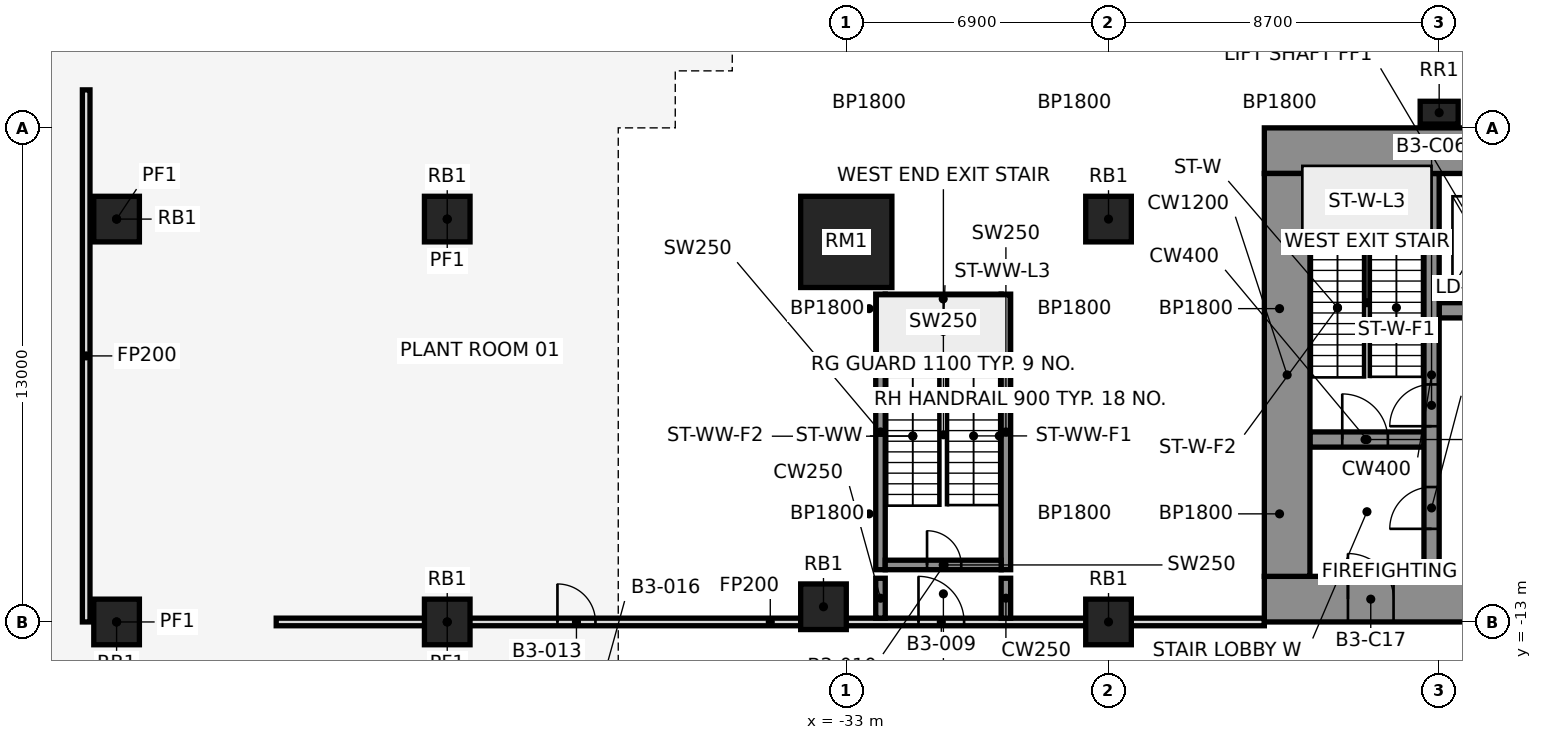
"""IFC4 building model, lengths in metres.
Left out: names, types, materials, properties, quantities, classifications, styles, units other than length and angle.
Written with IfcOpenShell. Run it as: python <this file> out.ifc"""

import sys

from ifc_helpers import new_model, si_unit, direction, frame, frame_2d, origin, origin_2d, place, context, subcontext, project, spatial, rectangle, extrude, element, fill, save


model = new_model("IFC4")
c1 = context("Model", 3, precision=1e-05, world=origin(), true_north=direction((0.0, 1.0)))
c2 = subcontext(c1, "Body", "Model", "MODEL_VIEW")
j1 = project(units=[si_unit("LENGTHUNIT", "METRE"), si_unit("PLANEANGLEUNIT", "RADIAN")], contexts=[c1])
p1 = place(None, origin())
s1 = spatial("IfcSite", under=j1, at=p1, CompositionType="ELEMENT")
p2 = place(p1, origin())
s2 = spatial("IfcBuilding", under=s1, at=p2, CompositionType="ELEMENT")
p3 = place(p2, frame((0.0, 0.0, -15.0)))
s3 = spatial("IfcBuildingStorey", under=s2, at=p3, CompositionType="ELEMENT", Elevation=-15.0)
p4 = place(p3, frame((-33.0, -3.0, 0.0), z_axis=(0.0, 0.0, 1.0), x_axis=(1.0, 0.0, 0.0)))
e1 = element("IfcColumn", 1, at=p4, inside=s3, PredefinedType="COLUMN", context=c2, shape_type="SweptSolid", body=[
    extrude(rectangle(XDim=2.4, YDim=2.4, at=origin_2d()), origin(), (0.0, 0.0, 1.0), 5.0),
])
p5 = place(p3, frame((-26.1, -2.4, 0.0), z_axis=(0.0, 0.0, 1.0), x_axis=(1.0, 0.0, 0.0)))
e2 = element("IfcColumn", 2, at=p5, inside=s3, PredefinedType="COLUMN", context=c2, shape_type="SweptSolid", body=[
    extrude(rectangle(XDim=1.2, YDim=1.2, at=origin_2d()), origin(), (0.0, 0.0, 1.0), 5.0),
])
p6 = place(p3, frame((-17.4, 0.4, 0.0), z_axis=(0.0, 0.0, 1.0), x_axis=(1.0, 0.0, 0.0)))
e3 = element("IfcColumn", 3, at=p6, inside=s3, PredefinedType="COLUMN", context=c2, shape_type="SweptSolid", body=[
    extrude(rectangle(XDim=1.0, YDim=0.6, at=origin_2d()), origin(), (0.0, 0.0, 1.0), 5.0),
])
p7 = place(p3, frame((-33.6, -12.6, 0.0), z_axis=(0.0, 0.0, 1.0), x_axis=(1.0, 0.0, 0.0)))
e4 = element("IfcColumn", 4, at=p7, inside=s3, PredefinedType="COLUMN", context=c2, shape_type="SweptSolid", body=[
    extrude(rectangle(XDim=1.2, YDim=1.2, at=origin_2d()), origin(), (0.0, 0.0, 1.0), 5.0),
])
for number, where, z_axis, x_axis in (
    (5, (-52.2, -2.4, -0.3), (0.0, 0.0, 1.0), (1.0, 0.0, 0.0)),
    (6, (-52.2, -13.0, -0.3), (0.0, 0.0, 1.0), (1.0, 0.0, 0.0)),
    (7, (-43.5, -2.4, -0.3), (0.0, 0.0, 1.0), (1.0, 0.0, 0.0)),
    (8, (-43.5, -13.0, -0.3), (0.0, 0.0, 1.0), (1.0, 0.0, 0.0)),
):
    element("IfcColumn", number, at=place(p3, frame(where, z_axis=z_axis, x_axis=x_axis)), inside=s3, PredefinedType="COLUMN", context=c2, shape_type="SweptSolid", body=[
        extrude(rectangle(XDim=1.2, YDim=1.2, at=origin_2d()), origin(), (0.0, 0.0, 1.0), 5.3),
    ])
p8 = place(p3, frame((-26.1, -13.0, 0.0), z_axis=(0.0, 0.0, 1.0), x_axis=(1.0, 0.0, 0.0)))
e9 = element("IfcColumn", 9, at=p8, inside=s3, PredefinedType="COLUMN", context=c2, shape_type="SweptSolid", body=[
    extrude(rectangle(XDim=1.2, YDim=1.2, at=origin_2d()), origin(), (0.0, 0.0, 1.0), 5.0),
])
for number, where, z_axis, x_axis in (
    (10, (-32.1, -11.625, 0.0), (0.0, 0.0, 1.0), (0.0, 1.0, 0.0)),
    (11, (-28.8, -11.625, 0.0), (0.0, 0.0, 1.0), (0.0, 1.0, 0.0)),
):
    element("IfcWall", number, at=place(p3, frame(where, z_axis=z_axis, x_axis=x_axis)), inside=s3, PredefinedType="SHEAR", context=c2, shape_type="SweptSolid", body=[
        extrude(rectangle(XDim=7.25, YDim=0.25, at=frame_2d((3.625, 0.0))), origin(), (0.0, 0.0, 1.0), 5.0),
    ])
p9 = place(p3, frame((-31.975, -11.5, 0.0), z_axis=(0.0, 0.0, 1.0), x_axis=(1.0, 0.0, 0.0)))
e12 = element("IfcWall", 12, at=p9, inside=s3, PredefinedType="SHEAR", context=c2, shape_type="SweptSolid", body=[
    extrude(rectangle(XDim=3.05, YDim=0.25, at=frame_2d((1.525, 0.0))), origin(), (0.0, 0.0, 1.0), 5.0),
])
p10 = place(p9, frame((1.1, 0.0, 0.0)))
e13 = element("IfcOpeningElement", 13, at=p10, cuts=e12, PredefinedType="OPENING", context=c2, shape_type="SweptSolid", body=[
    extrude(rectangle(XDim=0.9, YDim=2.1, at=frame_2d((0.45, 1.05))), frame((0.0, 0.137, 0.0), z_axis=(0.0, -1.0, 0.0), x_axis=(1.0, 0.0, 0.0)), (0.0, 0.0, 1.0), 0.274),
])
p11 = place(p3, frame((-31.975, -4.5, 0.0), z_axis=(0.0, 0.0, 1.0), x_axis=(1.0, 0.0, 0.0)))
e14 = element("IfcWall", 14, at=p11, inside=s3, PredefinedType="SHEAR", context=c2, shape_type="SweptSolid", body=[
    extrude(rectangle(XDim=3.05, YDim=0.25, at=frame_2d((1.525, 0.0))), origin(), (0.0, 0.0, 1.0), 5.0),
])
p12 = place(p3, frame((-48.0, -13.0, 0.0), z_axis=(0.0, 0.0, 1.0), x_axis=(1.0, 0.0, 0.0)))
e15 = element("IfcWall", 15, at=p12, inside=s3, PredefinedType="PARTITIONING", context=c2, shape_type="SweptSolid", body=[
    extrude(rectangle(XDim=26.0, YDim=0.2, at=frame_2d((13.0, 0.0))), origin(), (0.0, 0.0, 1.0), 4.7),
])
p13 = place(p12, frame((16.9, 0.0, 0.0)))
e16 = element("IfcOpeningElement", 16, at=p13, cuts=e15, PredefinedType="OPENING", context=c2, shape_type="SweptSolid", body=[
    extrude(rectangle(XDim=1.2, YDim=2.1, at=frame_2d((0.6, 1.05))), frame((0.0, 0.112, 0.0), z_axis=(0.0, -1.0, 0.0), x_axis=(1.0, 0.0, 0.0)), (0.0, 0.0, 1.0), 0.224),
])
p14 = place(p12, frame((7.4, 0.0, 0.0)))
e17 = element("IfcOpeningElement", 17, at=p14, cuts=e15, PredefinedType="OPENING", context=c2, shape_type="SweptSolid", body=[
    extrude(rectangle(XDim=1.0, YDim=2.1, at=frame_2d((0.5, 1.05))), frame((0.0, 0.112, 0.0), z_axis=(0.0, -1.0, 0.0), x_axis=(1.0, 0.0, 0.0)), (0.0, 0.0, 1.0), 0.224),
])
p15 = place(p3, frame((-53.0, -13.0, 0.0), z_axis=(0.0, 0.0, 1.0), x_axis=(0.0, 1.0, 0.0)))
e18 = element("IfcWall", 18, at=p15, inside=s3, PredefinedType="PARTITIONING", context=c2, shape_type="SweptSolid", body=[
    extrude(rectangle(XDim=14.0, YDim=0.2, at=frame_2d((7.0, 0.0))), origin(), (0.0, 0.0, 1.0), 4.7),
])
for number, where, z_axis, x_axis in (
    (19, (-32.1, -12.9, 0.0), (0.0, 0.0, 1.0), (0.0, 1.0, 0.0)),
    (20, (-28.8, -12.9, 0.0), (0.0, 0.0, 1.0), (0.0, 1.0, 0.0)),
):
    element("IfcWall", number, at=place(p3, frame(where, z_axis=z_axis, x_axis=x_axis)), inside=s3, PredefinedType="SHEAR", context=c2, shape_type="SweptSolid", body=[
        extrude(rectangle(XDim=1.05, YDim=0.25, at=frame_2d((0.525, 0.0))), origin(), (0.0, 0.0, 1.0), 5.0),
    ])
p16 = place(p3, frame((-20.8, -8.2, 0.0), z_axis=(0.0, 0.0, 1.0), x_axis=(1.0, 0.0, 0.0)))
e21 = element("IfcWall", 21, at=p16, inside=s3, PredefinedType="SHEAR", context=c2, shape_type="SweptSolid", body=[
    extrude(rectangle(XDim=3.0, YDim=0.4, at=frame_2d((1.5, 0.0))), origin(), (0.0, 0.0, 1.0), 5.0),
])
p17 = place(p16, frame((0.85, 0.0, 0.0)))
e22 = element("IfcOpeningElement", 22, at=p17, cuts=e21, PredefinedType="OPENING", context=c2, shape_type="SweptSolid", body=[
    extrude(rectangle(XDim=1.2, YDim=2.1, at=frame_2d((0.6, 1.05))), frame((0.0, 0.212, 0.0), z_axis=(0.0, -1.0, 0.0), x_axis=(1.0, 0.0, 0.0)), (0.0, 0.0, 1.0), 0.424),
])
p18 = place(p3, frame((-17.4, -4.8, 0.0), z_axis=(0.0, 0.0, 1.0), x_axis=(1.0, 0.0, 0.0)))
e23 = element("IfcWall", 23, at=p18, inside=s3, PredefinedType="SHEAR", context=c2, shape_type="SweptSolid", body=[
    extrude(rectangle(XDim=13.6, YDim=0.4, at=frame_2d((6.8, 0.0))), origin(), (0.0, 0.0, 1.0), 5.0),
])
p19 = place(p18, frame((0.65, 0.0, 0.0)))
e24 = element("IfcOpeningElement", 24, at=p19, cuts=e23, PredefinedType="OPENING", context=c2, shape_type="SweptSolid", body=[
    extrude(rectangle(XDim=1.1, YDim=2.1, at=frame_2d((0.55, 1.05))), frame((0.0, 0.212, 0.0), z_axis=(0.0, -1.0, 0.0), x_axis=(1.0, 0.0, 0.0)), (0.0, 0.0, 1.0), 0.424),
])
p20 = place(p18, frame((2.95, 0.0, 0.0)))
e25 = element("IfcOpeningElement", 25, at=p20, cuts=e23, PredefinedType="OPENING", context=c2, shape_type="SweptSolid", body=[
    extrude(rectangle(XDim=1.1, YDim=2.1, at=frame_2d((0.55, 1.05))), frame((0.0, 0.212, 0.0), z_axis=(0.0, -1.0, 0.0), x_axis=(1.0, 0.0, 0.0)), (0.0, 0.0, 1.0), 0.424),
])
p21 = place(p18, frame((5.65, 0.0, 0.0)))
e26 = element("IfcOpeningElement", 26, at=p21, cuts=e23, PredefinedType="OPENING", context=c2, shape_type="SweptSolid", body=[
    extrude(rectangle(XDim=1.2, YDim=2.1, at=frame_2d((0.6, 1.05))), frame((0.0, 0.212, 0.0), z_axis=(0.0, -1.0, 0.0), x_axis=(1.0, 0.0, 0.0)), (0.0, 0.0, 1.0), 0.424),
])
p22 = place(p18, frame((8.65, 0.0, 0.0)))
e27 = element("IfcOpeningElement", 27, at=p22, cuts=e23, PredefinedType="OPENING", context=c2, shape_type="SweptSolid", body=[
    extrude(rectangle(XDim=1.2, YDim=2.1, at=frame_2d((0.6, 1.05))), frame((0.0, 0.212, 0.0), z_axis=(0.0, -1.0, 0.0), x_axis=(1.0, 0.0, 0.0)), (0.0, 0.0, 1.0), 0.424),
])
p23 = place(p18, frame((11.65, 0.0, 0.0)))
e28 = element("IfcOpeningElement", 28, at=p23, cuts=e23, PredefinedType="OPENING", context=c2, shape_type="SweptSolid", body=[
    extrude(rectangle(XDim=1.2, YDim=2.1, at=frame_2d((0.6, 1.05))), frame((0.0, 0.212, 0.0), z_axis=(0.0, -1.0, 0.0), x_axis=(1.0, 0.0, 0.0)), (0.0, 0.0, 1.0), 0.424),
])
p24 = place(p3, frame((-17.6, -11.8, 0.0), z_axis=(0.0, 0.0, 1.0), x_axis=(0.0, 1.0, 0.0)))
e29 = element("IfcWall", 29, at=p24, inside=s3, PredefinedType="SHEAR", context=c2, shape_type="SweptSolid", body=[
    extrude(rectangle(XDim=10.6, YDim=0.4, at=frame_2d((5.3, 0.0))), origin(), (0.0, 0.0, 1.0), 5.0),
])
p25 = place(p24, frame((1.25, 0.0, 0.0)))
e30 = element("IfcOpeningElement", 30, at=p25, cuts=e29, PredefinedType="OPENING", context=c2, shape_type="SweptSolid", body=[
    extrude(rectangle(XDim=1.1, YDim=2.1, at=frame_2d((0.55, 1.05))), frame((0.0, 0.212, 0.0), z_axis=(0.0, -1.0, 0.0), x_axis=(1.0, 0.0, 0.0)), (0.0, 0.0, 1.0), 0.424),
])
p26 = place(p24, frame((3.95, 0.0, 0.0)))
e31 = element("IfcOpeningElement", 31, at=p26, cuts=e29, PredefinedType="OPENING", context=c2, shape_type="SweptSolid", body=[
    extrude(rectangle(XDim=1.1, YDim=2.1, at=frame_2d((0.55, 1.05))), frame((0.0, 0.212, 0.0), z_axis=(0.0, -1.0, 0.0), x_axis=(1.0, 0.0, 0.0)), (0.0, 0.0, 1.0), 0.424),
])
p27 = place(p3, frame((-22.0, -0.6, 0.0), z_axis=(0.0, 0.0, 1.0), x_axis=(1.0, 0.0, 0.0)))
e32 = element("IfcWall", 32, at=p27, inside=s3, PredefinedType="SHEAR", context=c2, shape_type="SweptSolid", body=[
    extrude(rectangle(XDim=44.0, YDim=1.2, at=frame_2d((22.0, 0.0))), origin(), (0.0, 0.0, 1.0), 5.0),
])
p28 = place(p3, frame((-22.0, -12.4, 0.0), z_axis=(0.0, 0.0, 1.0), x_axis=(1.0, 0.0, 0.0)))
e33 = element("IfcWall", 33, at=p28, inside=s3, PredefinedType="SHEAR", context=c2, shape_type="SweptSolid", body=[
    extrude(rectangle(XDim=44.0, YDim=1.2, at=frame_2d((22.0, 0.0))), origin(), (0.0, 0.0, 1.0), 5.0),
])
p29 = place(p28, frame((2.2, 0.0, 0.0)))
e34 = element("IfcOpeningElement", 34, at=p29, cuts=e33, PredefinedType="OPENING", context=c2, shape_type="SweptSolid", body=[
    extrude(rectangle(XDim=1.2, YDim=2.1, at=frame_2d((0.6, 1.05))), frame((0.0, 0.612, 0.0), z_axis=(0.0, -1.0, 0.0), x_axis=(1.0, 0.0, 0.0)), (0.0, 0.0, 1.0), 1.224),
])
p30 = place(p28, frame((21.4, 0.0, 0.0)))
e35 = element("IfcOpeningElement", 35, at=p30, cuts=e33, PredefinedType="OPENING", context=c2, shape_type="SweptSolid", body=[
    extrude(rectangle(XDim=1.2, YDim=2.1, at=frame_2d((0.6, 1.05))), frame((0.0, 0.612, 0.0), z_axis=(0.0, -1.0, 0.0), x_axis=(1.0, 0.0, 0.0)), (0.0, 0.0, 1.0), 1.224),
])
p31 = place(p28, frame((40.6, 0.0, 0.0)))
e36 = element("IfcOpeningElement", 36, at=p31, cuts=e33, PredefinedType="OPENING", context=c2, shape_type="SweptSolid", body=[
    extrude(rectangle(XDim=1.2, YDim=2.1, at=frame_2d((0.6, 1.05))), frame((0.0, 0.612, 0.0), z_axis=(0.0, -1.0, 0.0), x_axis=(1.0, 0.0, 0.0)), (0.0, 0.0, 1.0), 1.224),
])
p32 = place(p28, frame((16.0, 0.0, 0.0)))
e37 = element("IfcOpeningElement", 37, at=p32, cuts=e33, PredefinedType="OPENING", context=c2, shape_type="SweptSolid", body=[
    extrude(rectangle(XDim=1.8, YDim=2.1, at=frame_2d((0.9, 1.05))), frame((0.0, 0.612, 0.0), z_axis=(0.0, -1.0, 0.0), x_axis=(1.0, 0.0, 0.0)), (0.0, 0.0, 1.0), 1.224),
])
p33 = place(p28, frame((6.3, 0.0, 0.0)))
e38 = element("IfcOpeningElement", 38, at=p33, cuts=e33, PredefinedType="OPENING", context=c2, shape_type="SweptSolid", body=[
    extrude(rectangle(XDim=1.2, YDim=2.1, at=frame_2d((0.6, 1.05))), frame((0.0, 0.612, 0.0), z_axis=(0.0, -1.0, 0.0), x_axis=(1.0, 0.0, 0.0)), (0.0, 0.0, 1.0), 1.224),
])
p34 = place(p28, frame((26.2, 0.0, 0.0)))
e39 = element("IfcOpeningElement", 39, at=p34, cuts=e33, PredefinedType="OPENING", context=c2, shape_type="SweptSolid", body=[
    extrude(rectangle(XDim=1.8, YDim=2.1, at=frame_2d((0.9, 1.05))), frame((0.0, 0.612, 0.0), z_axis=(0.0, -1.0, 0.0), x_axis=(1.0, 0.0, 0.0)), (0.0, 0.0, 1.0), 1.224),
])
p35 = place(p28, frame((36.5, 0.0, 0.0)))
e40 = element("IfcOpeningElement", 40, at=p35, cuts=e33, PredefinedType="OPENING", context=c2, shape_type="SweptSolid", body=[
    extrude(rectangle(XDim=1.2, YDim=2.1, at=frame_2d((0.6, 1.05))), frame((0.0, 0.612, 0.0), z_axis=(0.0, -1.0, 0.0), x_axis=(1.0, 0.0, 0.0)), (0.0, 0.0, 1.0), 1.224),
])
p36 = place(p3, frame((-21.4, -11.8, 0.0), z_axis=(0.0, 0.0, 1.0), x_axis=(0.0, 1.0, 0.0)))
e41 = element("IfcWall", 41, at=p36, inside=s3, PredefinedType="SHEAR", context=c2, shape_type="SweptSolid", body=[
    extrude(rectangle(XDim=10.6, YDim=1.2, at=frame_2d((5.3, 0.0))), origin(), (0.0, 0.0, 1.0), 5.0),
])
p37 = place(p13, origin())
e42 = element("IfcDoor", 42, at=p37, inside=s3, OperationType="SINGLE_SWING_RIGHT", PredefinedType="DOOR", context=c2, shape_type="SweptSolid", body=[
    extrude(rectangle(XDim=1.2, YDim=2.1, at=frame_2d((0.6, 1.05))), frame((0.0, 0.025, 0.0), z_axis=(0.0, -1.0, 0.0), x_axis=(1.0, 0.0, 0.0)), (0.0, 0.0, 1.0), 0.05),
])
fill(e16, e42)
p38 = place(p10, origin())
e43 = element("IfcDoor", 43, at=p38, inside=s3, OperationType="SINGLE_SWING_LEFT", PredefinedType="DOOR", context=c2, shape_type="SweptSolid", body=[
    extrude(rectangle(XDim=0.9, YDim=2.1, at=frame_2d((0.45, 1.05))), frame((0.0, 0.025, 0.0), z_axis=(0.0, -1.0, 0.0), x_axis=(1.0, 0.0, 0.0)), (0.0, 0.0, 1.0), 0.05),
])
fill(e13, e43)
p39 = place(p14, origin())
e44 = element("IfcDoor", 44, at=p39, inside=s3, OperationType="SINGLE_SWING_LEFT", PredefinedType="DOOR", context=c2, shape_type="SweptSolid", body=[
    extrude(rectangle(XDim=1.0, YDim=2.1, at=frame_2d((0.5, 1.05))), frame((0.0, 0.025, 0.0), z_axis=(0.0, -1.0, 0.0), x_axis=(1.0, 0.0, 0.0)), (0.0, 0.0, 1.0), 0.05),
])
fill(e17, e44)
p40 = place(p17, origin())
e45 = element("IfcDoor", 45, at=p40, inside=s3, OperationType="SINGLE_SWING_LEFT", PredefinedType="DOOR", context=c2, shape_type="SweptSolid", body=[
    extrude(rectangle(XDim=1.2, YDim=2.1, at=frame_2d((0.6, 1.05))), frame((0.0, 0.025, 0.0), z_axis=(0.0, -1.0, 0.0), x_axis=(1.0, 0.0, 0.0)), (0.0, 0.0, 1.0), 0.05),
])
fill(e22, e45)
p41 = place(p25, frame((1.1, 0.0, 0.0), z_axis=(0.0, 0.0, 1.0), x_axis=(-1.0, 0.0, 0.0)))
e46 = element("IfcDoor", 46, at=p41, inside=s3, OperationType="SINGLE_SWING_LEFT", PredefinedType="DOOR", context=c2, shape_type="SweptSolid", body=[
    extrude(rectangle(XDim=1.1, YDim=2.1, at=frame_2d((0.55, 1.05))), frame((0.0, 0.025, 0.0), z_axis=(0.0, -1.0, 0.0), x_axis=(1.0, 0.0, 0.0)), (0.0, 0.0, 1.0), 0.05),
])
fill(e30, e46)
p42 = place(p26, frame((1.1, 0.0, 0.0), z_axis=(0.0, 0.0, 1.0), x_axis=(-1.0, 0.0, 0.0)))
e47 = element("IfcDoor", 47, at=p42, inside=s3, OperationType="SINGLE_SWING_LEFT", PredefinedType="DOOR", context=c2, shape_type="SweptSolid", body=[
    extrude(rectangle(XDim=1.1, YDim=2.1, at=frame_2d((0.55, 1.05))), frame((0.0, 0.025, 0.0), z_axis=(0.0, -1.0, 0.0), x_axis=(1.0, 0.0, 0.0)), (0.0, 0.0, 1.0), 0.05),
])
fill(e31, e47)
p43 = place(p29, frame((1.2, 0.0, 0.0), z_axis=(0.0, 0.0, 1.0), x_axis=(-1.0, 0.0, 0.0)))
e48 = element("IfcDoor", 48, at=p43, inside=s3, OperationType="SINGLE_SWING_RIGHT", PredefinedType="DOOR", context=c2, shape_type="SweptSolid", body=[
    extrude(rectangle(XDim=1.2, YDim=2.1, at=frame_2d((0.6, 1.05))), frame((0.0, 0.025, 0.0), z_axis=(0.0, -1.0, 0.0), x_axis=(1.0, 0.0, 0.0)), (0.0, 0.0, 1.0), 0.05),
])
fill(e34, e48)
save(model, sys.argv[1])
